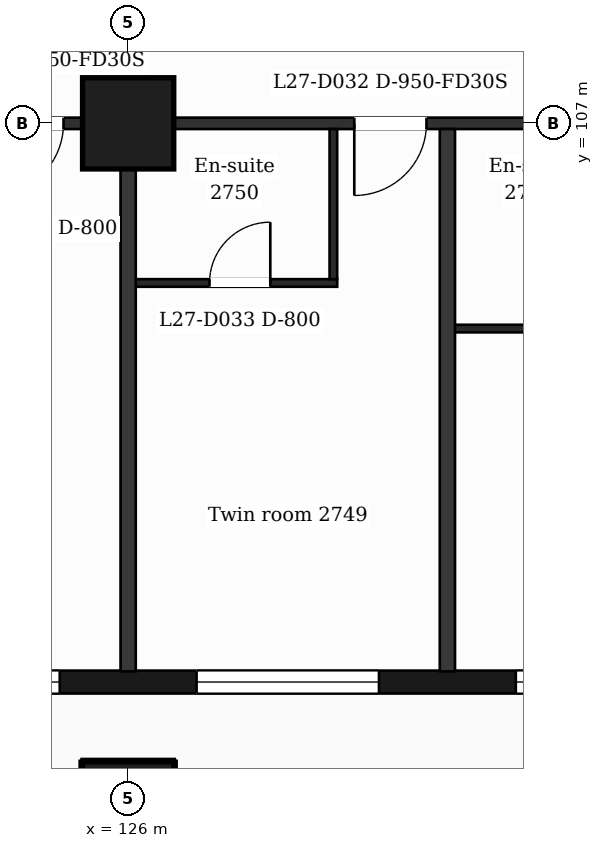
"""IFC4 building model, lengths in metres.
Left out: names, types, materials, properties, quantities, classifications, styles, units other than length and angle.
Written with IfcOpenShell. Run it as: python <this file> out.ifc"""

import sys

from ifc_helpers import new_model, si_unit, direction, frame, frame_2d, origin, origin_2d, place, context, subcontext, project, spatial, rectangle, extrude, element, fill, save


model = new_model("IFC4")
c1 = context("Model", 3, precision=1e-05, world=origin(), true_north=direction((0.0, 1.0)))
c2 = subcontext(c1, "Body", "Model", "MODEL_VIEW")
j1 = project(units=[si_unit("LENGTHUNIT", "METRE"), si_unit("PLANEANGLEUNIT", "RADIAN")], contexts=[c1])
p1 = place(None, origin())
s1 = spatial("IfcSite", under=j1, at=p1, CompositionType="ELEMENT")
p2 = place(p1, origin())
s2 = spatial("IfcBuilding", under=s1, at=p2, CompositionType="ELEMENT")
p3 = place(p2, frame((0.0, 0.0, 116.9)))
s3 = spatial("IfcBuildingStorey", under=s2, at=p3, CompositionType="ELEMENT", Elevation=116.9)
for number, where, z_axis, x_axis in (
    (1, (126.0, 98.0, 0.0), (0.0, 0.0, 1.0), (1.0, 0.0, 0.0)),
    (2, (126.0, 107.0, 0.0), (0.0, 0.0, 1.0), (1.0, 0.0, 0.0)),
):
    element("IfcColumn", number, at=place(p3, frame(where, z_axis=z_axis, x_axis=x_axis)), inside=s3, PredefinedType="COLUMN", context=c2, shape_type="SweptSolid", body=[
        extrude(rectangle(XDim=1.2, YDim=1.2, at=origin_2d()), origin(), (0.0, 0.0, 1.0), 3.7),
    ])
p4 = place(p3, frame((89.85, 99.65, 0.0), z_axis=(0.0, 0.0, 1.0), x_axis=(1.0, 0.0, 0.0)))
e3 = element("IfcWall", 3, at=p4, inside=s3, PredefinedType="SOLIDWALL", context=c2, shape_type="SweptSolid", body=[
    extrude(rectangle(XDim=47.25, YDim=0.3, at=frame_2d((23.625, 0.0))), origin(), (0.0, 0.0, 1.0), 3.38),
])
p5 = place(p4, frame((0.725, 0.0, 0.9)))
e4 = element("IfcOpeningElement", 4, at=p5, cuts=e3, PredefinedType="OPENING", context=c2, shape_type="SweptSolid", body=[
    extrude(rectangle(XDim=1.2, YDim=2.1, at=frame_2d((0.6, 1.05))), frame((0.0, 0.16, 0.0), z_axis=(0.0, -1.0, 0.0), x_axis=(1.0, 0.0, 0.0)), (0.0, 0.0, 1.0), 0.32),
])
p6 = place(p4, frame((3.45, 0.0, 0.9)))
e5 = element("IfcOpeningElement", 5, at=p6, cuts=e3, PredefinedType="OPENING", context=c2, shape_type="SweptSolid", body=[
    extrude(rectangle(XDim=2.4, YDim=2.1, at=frame_2d((1.2, 1.05))), frame((0.0, 0.16, 0.0), z_axis=(0.0, -1.0, 0.0), x_axis=(1.0, 0.0, 0.0)), (0.0, 0.0, 1.0), 0.32),
])
p7 = place(p4, frame((7.35, 0.0, 0.0)))
e6 = element("IfcOpeningElement", 6, at=p7, cuts=e3, PredefinedType="OPENING", context=c2, shape_type="SweptSolid", body=[
    extrude(rectangle(XDim=1.2, YDim=2.4, at=frame_2d((0.6, 1.2))), frame((0.0, 0.16, 0.0), z_axis=(0.0, -1.0, 0.0), x_axis=(1.0, 0.0, 0.0)), (0.0, 0.0, 1.0), 0.32),
])
p8 = place(p4, frame((9.15, 0.0, 0.9)))
e7 = element("IfcOpeningElement", 7, at=p8, cuts=e3, PredefinedType="OPENING", context=c2, shape_type="SweptSolid", body=[
    extrude(rectangle(XDim=1.2, YDim=2.1, at=frame_2d((0.6, 1.05))), frame((0.0, 0.16, 0.0), z_axis=(0.0, -1.0, 0.0), x_axis=(1.0, 0.0, 0.0)), (0.0, 0.0, 1.0), 0.32),
])
p9 = place(p4, frame((11.85, 0.0, 0.9)))
e8 = element("IfcOpeningElement", 8, at=p9, cuts=e3, PredefinedType="OPENING", context=c2, shape_type="SweptSolid", body=[
    extrude(rectangle(XDim=2.4, YDim=2.1, at=frame_2d((1.2, 1.05))), frame((0.0, 0.16, 0.0), z_axis=(0.0, -1.0, 0.0), x_axis=(1.0, 0.0, 0.0)), (0.0, 0.0, 1.0), 0.32),
])
p10 = place(p4, frame((16.05, 0.0, 0.9)))
e9 = element("IfcOpeningElement", 9, at=p10, cuts=e3, PredefinedType="OPENING", context=c2, shape_type="SweptSolid", body=[
    extrude(rectangle(XDim=2.4, YDim=2.1, at=frame_2d((1.2, 1.05))), frame((0.0, 0.16, 0.0), z_axis=(0.0, -1.0, 0.0), x_axis=(1.0, 0.0, 0.0)), (0.0, 0.0, 1.0), 0.32),
])
p11 = place(p4, frame((20.85, 0.0, 0.9)))
e10 = element("IfcOpeningElement", 10, at=p11, cuts=e3, PredefinedType="OPENING", context=c2, shape_type="SweptSolid", body=[
    extrude(rectangle(XDim=1.2, YDim=2.1, at=frame_2d((0.6, 1.05))), frame((0.0, 0.16, 0.0), z_axis=(0.0, -1.0, 0.0), x_axis=(1.0, 0.0, 0.0)), (0.0, 0.0, 1.0), 0.32),
])
p12 = place(p4, frame((25.05, 0.0, 0.9)))
e11 = element("IfcOpeningElement", 11, at=p12, cuts=e3, PredefinedType="OPENING", context=c2, shape_type="SweptSolid", body=[
    extrude(rectangle(XDim=1.2, YDim=2.1, at=frame_2d((0.6, 1.05))), frame((0.0, 0.16, 0.0), z_axis=(0.0, -1.0, 0.0), x_axis=(1.0, 0.0, 0.0)), (0.0, 0.0, 1.0), 0.32),
])
p13 = place(p4, frame((28.65, 0.0, 0.9)))
e12 = element("IfcOpeningElement", 12, at=p13, cuts=e3, PredefinedType="OPENING", context=c2, shape_type="SweptSolid", body=[
    extrude(rectangle(XDim=2.4, YDim=2.1, at=frame_2d((1.2, 1.05))), frame((0.0, 0.16, 0.0), z_axis=(0.0, -1.0, 0.0), x_axis=(1.0, 0.0, 0.0)), (0.0, 0.0, 1.0), 0.32),
])
p14 = place(p4, frame((32.85, 0.0, 0.9)))
e13 = element("IfcOpeningElement", 13, at=p14, cuts=e3, PredefinedType="OPENING", context=c2, shape_type="SweptSolid", body=[
    extrude(rectangle(XDim=2.4, YDim=2.1, at=frame_2d((1.2, 1.05))), frame((0.0, 0.16, 0.0), z_axis=(0.0, -1.0, 0.0), x_axis=(1.0, 0.0, 0.0)), (0.0, 0.0, 1.0), 0.32),
])
p15 = place(p4, frame((37.05, 0.0, 0.9)))
e14 = element("IfcOpeningElement", 14, at=p15, cuts=e3, PredefinedType="OPENING", context=c2, shape_type="SweptSolid", body=[
    extrude(rectangle(XDim=2.4, YDim=2.1, at=frame_2d((1.2, 1.05))), frame((0.0, 0.16, 0.0), z_axis=(0.0, -1.0, 0.0), x_axis=(1.0, 0.0, 0.0)), (0.0, 0.0, 1.0), 0.32),
])
p16 = place(p4, frame((41.25, 0.0, 0.9)))
e15 = element("IfcOpeningElement", 15, at=p16, cuts=e3, PredefinedType="OPENING", context=c2, shape_type="SweptSolid", body=[
    extrude(rectangle(XDim=2.4, YDim=2.1, at=frame_2d((1.2, 1.05))), frame((0.0, 0.16, 0.0), z_axis=(0.0, -1.0, 0.0), x_axis=(1.0, 0.0, 0.0)), (0.0, 0.0, 1.0), 0.32),
])
p17 = place(p4, frame((45.25, 0.0, 0.9)))
e16 = element("IfcOpeningElement", 16, at=p17, cuts=e3, PredefinedType="OPENING", context=c2, shape_type="SweptSolid", body=[
    extrude(rectangle(XDim=1.2, YDim=2.1, at=frame_2d((0.6, 1.05))), frame((0.0, 0.16, 0.0), z_axis=(0.0, -1.0, 0.0), x_axis=(1.0, 0.0, 0.0)), (0.0, 0.0, 1.0), 0.32),
])
p18 = place(p3, frame((130.2, 104.3, 0.0), z_axis=(0.0, 0.0, 1.0), x_axis=(1.0, 0.0, 0.0)))
e17 = element("IfcWall", 17, at=p18, inside=s3, PredefinedType="PARTITIONING", context=c2, shape_type="SweptSolid", body=[
    extrude(rectangle(XDim=2.15, YDim=0.1, at=frame_2d((1.075, 0.0))), origin(), (0.0, 0.0, 1.0), 3.38),
])
p19 = place(p3, frame((126.0, 104.9, 0.0), z_axis=(0.0, 0.0, 1.0), x_axis=(1.0, 0.0, 0.0)))
e18 = element("IfcWall", 18, at=p19, inside=s3, PredefinedType="PARTITIONING", context=c2, shape_type="SweptSolid", body=[
    extrude(rectangle(XDim=2.75, YDim=0.1, at=frame_2d((1.375, 0.0))), origin(), (0.0, 0.0, 1.0), 3.38),
])
p20 = place(p19, frame((1.07, 0.0, 0.0)))
e19 = element("IfcOpeningElement", 19, at=p20, cuts=e18, PredefinedType="OPENING", context=c2, shape_type="SweptSolid", body=[
    extrude(rectangle(XDim=0.8, YDim=2.1, at=frame_2d((0.4, 1.05))), frame((0.0, 0.06, 0.0), z_axis=(0.0, -1.0, 0.0), x_axis=(1.0, 0.0, 0.0)), (0.0, 0.0, 1.0), 0.12),
])
p21 = place(p3, frame((87.018, 107.0, 0.0), z_axis=(0.0, 0.0, 1.0), x_axis=(1.0, 0.0, 0.0)))
e20 = element("IfcWall", 20, at=p21, inside=s3, PredefinedType="PARTITIONING", context=c2, shape_type="SweptSolid", body=[
    extrude(rectangle(XDim=52.765, YDim=0.15, at=frame_2d((26.382, 0.0))), origin(), (0.0, 0.0, 1.0), 3.38),
])
p22 = place(p21, frame((1.276, 0.0, 0.0)))
e21 = element("IfcOpeningElement", 21, at=p22, cuts=e20, PredefinedType="OPENING", context=c2, shape_type="SweptSolid", body=[
    extrude(rectangle(XDim=0.95, YDim=2.1, at=frame_2d((0.475, 1.05))), frame((0.0, 0.085, 0.0), z_axis=(0.0, -1.0, 0.0), x_axis=(1.0, 0.0, 0.0)), (0.0, 0.0, 1.0), 0.17),
])
p23 = place(p21, frame((6.192, 0.0, 0.0)))
e22 = element("IfcOpeningElement", 22, at=p23, cuts=e20, PredefinedType="OPENING", context=c2, shape_type="SweptSolid", body=[
    extrude(rectangle(XDim=0.95, YDim=2.1, at=frame_2d((0.475, 1.05))), frame((0.0, 0.085, 0.0), z_axis=(0.0, -1.0, 0.0), x_axis=(1.0, 0.0, 0.0)), (0.0, 0.0, 1.0), 0.17),
])
p24 = place(p21, frame((11.982, 0.0, 0.0)))
e23 = element("IfcOpeningElement", 23, at=p24, cuts=e20, PredefinedType="OPENING", context=c2, shape_type="SweptSolid", body=[
    extrude(rectangle(XDim=1.0, YDim=2.1, at=frame_2d((0.5, 1.05))), frame((0.0, 0.085, 0.0), z_axis=(0.0, -1.0, 0.0), x_axis=(1.0, 0.0, 0.0)), (0.0, 0.0, 1.0), 0.17),
])
p25 = place(p21, frame((14.582, 0.0, 0.0)))
e24 = element("IfcOpeningElement", 24, at=p25, cuts=e20, PredefinedType="OPENING", context=c2, shape_type="SweptSolid", body=[
    extrude(rectangle(XDim=0.95, YDim=2.1, at=frame_2d((0.475, 1.05))), frame((0.0, 0.085, 0.0), z_axis=(0.0, -1.0, 0.0), x_axis=(1.0, 0.0, 0.0)), (0.0, 0.0, 1.0), 0.17),
])
p26 = place(p21, frame((18.257, 0.0, 0.0)))
e25 = element("IfcOpeningElement", 25, at=p26, cuts=e20, PredefinedType="OPENING", context=c2, shape_type="SweptSolid", body=[
    extrude(rectangle(XDim=0.95, YDim=2.1, at=frame_2d((0.475, 1.05))), frame((0.0, 0.085, 0.0), z_axis=(0.0, -1.0, 0.0), x_axis=(1.0, 0.0, 0.0)), (0.0, 0.0, 1.0), 0.17),
])
p27 = place(p21, frame((22.992, 0.0, 0.0)))
e26 = element("IfcOpeningElement", 26, at=p27, cuts=e20, PredefinedType="OPENING", context=c2, shape_type="SweptSolid", body=[
    extrude(rectangle(XDim=0.95, YDim=2.1, at=frame_2d((0.475, 1.05))), frame((0.0, 0.085, 0.0), z_axis=(0.0, -1.0, 0.0), x_axis=(1.0, 0.0, 0.0)), (0.0, 0.0, 1.0), 0.17),
])
p28 = place(p21, frame((26.632, 0.0, 0.0)))
e27 = element("IfcOpeningElement", 27, at=p28, cuts=e20, PredefinedType="OPENING", context=c2, shape_type="SweptSolid", body=[
    extrude(rectangle(XDim=1.0, YDim=2.1, at=frame_2d((0.5, 1.05))), frame((0.0, 0.085, 0.0), z_axis=(0.0, -1.0, 0.0), x_axis=(1.0, 0.0, 0.0)), (0.0, 0.0, 1.0), 0.17),
])
p29 = place(p21, frame((33.557, 0.0, 0.0)))
e28 = element("IfcOpeningElement", 28, at=p29, cuts=e20, PredefinedType="OPENING", context=c2, shape_type="SweptSolid", body=[
    extrude(rectangle(XDim=0.95, YDim=2.1, at=frame_2d((0.475, 1.05))), frame((0.0, 0.085, 0.0), z_axis=(0.0, -1.0, 0.0), x_axis=(1.0, 0.0, 0.0)), (0.0, 0.0, 1.0), 0.17),
])
p30 = place(p21, frame((37.182, 0.0, 0.0)))
e29 = element("IfcOpeningElement", 29, at=p30, cuts=e20, PredefinedType="OPENING", context=c2, shape_type="SweptSolid", body=[
    extrude(rectangle(XDim=0.95, YDim=2.1, at=frame_2d((0.475, 1.05))), frame((0.0, 0.085, 0.0), z_axis=(0.0, -1.0, 0.0), x_axis=(1.0, 0.0, 0.0)), (0.0, 0.0, 1.0), 0.17),
])
p31 = place(p21, frame((41.957, 0.0, 0.0)))
e30 = element("IfcOpeningElement", 30, at=p31, cuts=e20, PredefinedType="OPENING", context=c2, shape_type="SweptSolid", body=[
    extrude(rectangle(XDim=0.95, YDim=2.1, at=frame_2d((0.475, 1.05))), frame((0.0, 0.085, 0.0), z_axis=(0.0, -1.0, 0.0), x_axis=(1.0, 0.0, 0.0)), (0.0, 0.0, 1.0), 0.17),
])
p32 = place(p21, frame((45.622, 0.0, 0.0)))
e31 = element("IfcOpeningElement", 31, at=p32, cuts=e20, PredefinedType="OPENING", context=c2, shape_type="SweptSolid", body=[
    extrude(rectangle(XDim=0.95, YDim=2.1, at=frame_2d((0.475, 1.05))), frame((0.0, 0.085, 0.0), z_axis=(0.0, -1.0, 0.0), x_axis=(1.0, 0.0, 0.0)), (0.0, 0.0, 1.0), 0.17),
])
p33 = place(p21, frame((48.56, 0.0, 0.0)))
e32 = element("IfcOpeningElement", 32, at=p33, cuts=e20, PredefinedType="OPENING", context=c2, shape_type="SweptSolid", body=[
    extrude(rectangle(XDim=0.95, YDim=2.1, at=frame_2d((0.475, 1.05))), frame((0.0, 0.085, 0.0), z_axis=(0.0, -1.0, 0.0), x_axis=(1.0, 0.0, 0.0)), (0.0, 0.0, 1.0), 0.17),
])
p34 = place(p3, frame((126.0, 99.79, 0.0), z_axis=(0.0, 0.0, 1.0), x_axis=(0.0, 1.0, 0.0)))
e33 = element("IfcWall", 33, at=p34, inside=s3, PredefinedType="PARTITIONING", context=c2, shape_type="SweptSolid", body=[
    extrude(rectangle(XDim=7.135, YDim=0.2, at=frame_2d((3.567, 0.0))), origin(), (0.0, 0.0, 1.0), 3.38),
])
p35 = place(p3, frame((128.7, 104.95, 0.0), z_axis=(0.0, 0.0, 1.0), x_axis=(0.0, 1.0, 0.0)))
e34 = element("IfcWall", 34, at=p35, inside=s3, PredefinedType="PARTITIONING", context=c2, shape_type="SweptSolid", body=[
    extrude(rectangle(XDim=1.975, YDim=0.1, at=frame_2d((0.988, 0.0))), origin(), (0.0, 0.0, 1.0), 3.38),
])
p36 = place(p3, frame((130.2, 99.79, 0.0), z_axis=(0.0, 0.0, 1.0), x_axis=(0.0, 1.0, 0.0)))
e35 = element("IfcWall", 35, at=p36, inside=s3, PredefinedType="PARTITIONING", context=c2, shape_type="SweptSolid", body=[
    extrude(rectangle(XDim=7.135, YDim=0.2, at=frame_2d((3.567, 0.0))), origin(), (0.0, 0.0, 1.0), 3.38),
])
p37 = place(p14, origin())
e36 = element("IfcWindow", 36, at=p37, inside=s3, PartitioningType="SINGLE_PANEL", PredefinedType="WINDOW", context=c2, shape_type="SweptSolid", body=[
    extrude(rectangle(XDim=2.4, YDim=2.1, at=frame_2d((1.2, 1.05))), frame((0.0, 0.03, 0.0), z_axis=(0.0, -1.0, 0.0), x_axis=(1.0, 0.0, 0.0)), (0.0, 0.0, 1.0), 0.06),
])
fill(e13, e36)
p38 = place(p15, origin())
e37 = element("IfcWindow", 37, at=p38, inside=s3, PartitioningType="SINGLE_PANEL", PredefinedType="WINDOW", context=c2, shape_type="SweptSolid", body=[
    extrude(rectangle(XDim=2.4, YDim=2.1, at=frame_2d((1.2, 1.05))), frame((0.0, 0.03, 0.0), z_axis=(0.0, -1.0, 0.0), x_axis=(1.0, 0.0, 0.0)), (0.0, 0.0, 1.0), 0.06),
])
fill(e14, e37)
p39 = place(p16, origin())
e38 = element("IfcWindow", 38, at=p39, inside=s3, PartitioningType="SINGLE_PANEL", PredefinedType="WINDOW", context=c2, shape_type="SweptSolid", body=[
    extrude(rectangle(XDim=2.4, YDim=2.1, at=frame_2d((1.2, 1.05))), frame((0.0, 0.03, 0.0), z_axis=(0.0, -1.0, 0.0), x_axis=(1.0, 0.0, 0.0)), (0.0, 0.0, 1.0), 0.06),
])
fill(e15, e38)
p40 = place(p30, origin())
e39 = element("IfcDoor", 39, at=p40, inside=s3, OperationType="SINGLE_SWING_LEFT", PredefinedType="DOOR", context=c2, shape_type="SweptSolid", body=[
    extrude(rectangle(XDim=0.95, YDim=2.1, at=frame_2d((0.475, 1.05))), frame((0.0, 0.025, 0.0), z_axis=(0.0, -1.0, 0.0), x_axis=(1.0, 0.0, 0.0)), (0.0, 0.0, 1.0), 0.05),
])
fill(e29, e39)
p41 = place(p31, origin())
e40 = element("IfcDoor", 40, at=p41, inside=s3, OperationType="SINGLE_SWING_LEFT", PredefinedType="DOOR", context=c2, shape_type="SweptSolid", body=[
    extrude(rectangle(XDim=0.95, YDim=2.1, at=frame_2d((0.475, 1.05))), frame((0.0, 0.025, 0.0), z_axis=(0.0, -1.0, 0.0), x_axis=(1.0, 0.0, 0.0)), (0.0, 0.0, 1.0), 0.05),
])
fill(e30, e40)
p42 = place(p20, origin())
e41 = element("IfcDoor", 41, at=p42, inside=s3, OperationType="SINGLE_SWING_RIGHT", PredefinedType="DOOR", context=c2, shape_type="SweptSolid", body=[
    extrude(rectangle(XDim=0.8, YDim=2.1, at=frame_2d((0.4, 1.05))), frame((0.0, 0.025, 0.0), z_axis=(0.0, -1.0, 0.0), x_axis=(1.0, 0.0, 0.0)), (0.0, 0.0, 1.0), 0.05),
])
fill(e19, e41)
save(model, sys.argv[1])
